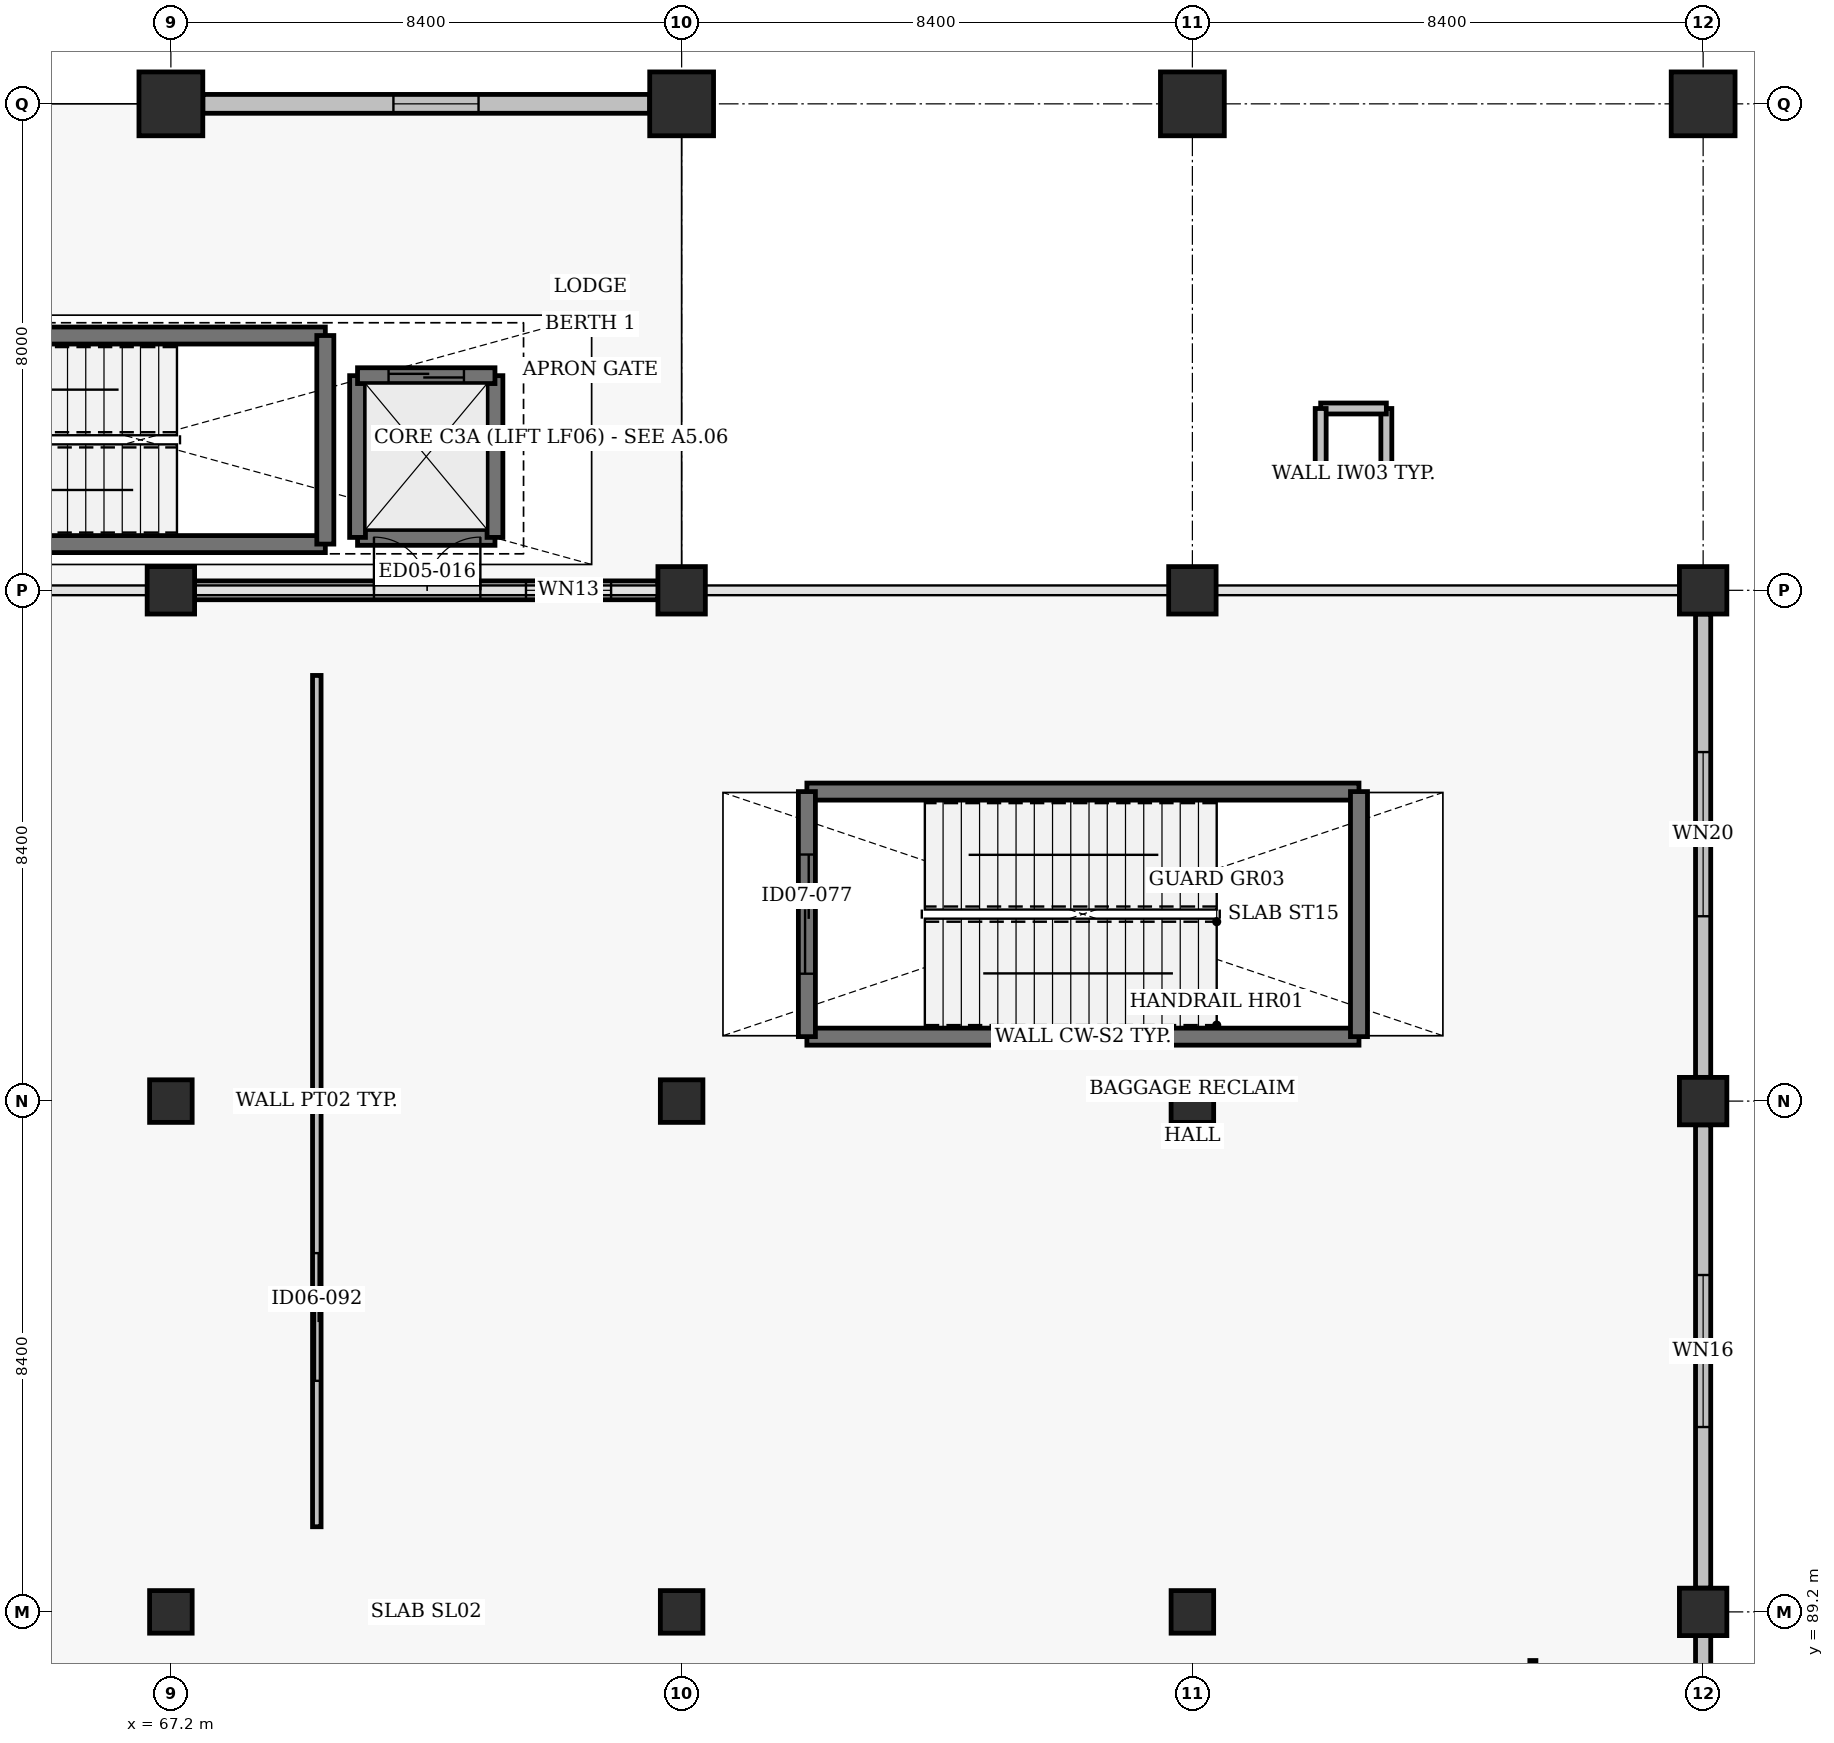
"""IFC4 building model, lengths in metres.
Left out: names, types, materials, properties, quantities, classifications, styles, units other than length and angle.
Written with IfcOpenShell. Run it as: python <this file> out.ifc"""

import sys

from ifc_helpers import new_model, si_unit, direction, frame, frame_2d, origin, origin_2d, place, context, subcontext, project, spatial, rectangle, circle, extrude, element, fill, save


model = new_model("IFC4")
c1 = context("Model", 3, precision=1e-05, world=origin(), true_north=direction((0.0, 1.0)))
c2 = subcontext(c1, "Body", "Model", "MODEL_VIEW")
j1 = project(units=[si_unit("LENGTHUNIT", "METRE"), si_unit("PLANEANGLEUNIT", "RADIAN")], contexts=[c1])
p1 = place(None, origin())
s1 = spatial("IfcSite", under=j1, at=p1, CompositionType="ELEMENT")
p2 = place(p1, origin())
s2 = spatial("IfcBuilding", under=s1, at=p2, CompositionType="ELEMENT")
p3 = place(p2, origin())
s3 = spatial("IfcBuildingStorey", under=s2, at=p3, CompositionType="ELEMENT", Elevation=0.0)
for number, where, z_axis, x_axis in (
    (1, (67.2, 89.2, -0.46), (0.0, 0.0, 1.0), (1.0, 0.0, 0.0)),
    (2, (67.2, 97.6, -0.46), (0.0, 0.0, 1.0), (1.0, 0.0, 0.0)),
):
    element("IfcColumn", number, at=place(p3, frame(where, z_axis=z_axis, x_axis=x_axis)), inside=s3, PredefinedType="COLUMN", context=c2, shape_type="SweptSolid", body=[
        extrude(rectangle(XDim=0.7, YDim=0.7, at=origin_2d()), origin(), (0.0, 0.0, 1.0), 5.9),
    ])
p4 = place(p3, frame((67.2, 106.0, -0.46), z_axis=(0.0, 0.0, 1.0), x_axis=(1.0, 0.0, 0.0)))
e3 = element("IfcColumn", 3, at=p4, inside=s3, PredefinedType="COLUMN", context=c2, shape_type="SweptSolid", body=[
    extrude(circle(Radius=0.39, at=origin_2d()), origin(), (0.0, 0.0, 1.0), 5.9),
])
for number, where, z_axis, x_axis in (
    (4, (75.6, 89.2, -0.46), (0.0, 0.0, 1.0), (1.0, 0.0, 0.0)),
    (5, (75.6, 97.6, -0.46), (0.0, 0.0, 1.0), (1.0, 0.0, 0.0)),
):
    element("IfcColumn", number, at=place(p3, frame(where, z_axis=z_axis, x_axis=x_axis)), inside=s3, PredefinedType="COLUMN", context=c2, shape_type="SweptSolid", body=[
        extrude(rectangle(XDim=0.7, YDim=0.7, at=origin_2d()), origin(), (0.0, 0.0, 1.0), 5.9),
    ])
p5 = place(p3, frame((75.6, 106.0, -0.46), z_axis=(0.0, 0.0, 1.0), x_axis=(1.0, 0.0, 0.0)))
e6 = element("IfcColumn", 6, at=p5, inside=s3, PredefinedType="COLUMN", context=c2, shape_type="SweptSolid", body=[
    extrude(circle(Radius=0.39, at=origin_2d()), origin(), (0.0, 0.0, 1.0), 5.9),
])
for number, where, z_axis, x_axis in (
    (7, (84.0, 89.2, -0.46), (0.0, 0.0, 1.0), (1.0, 0.0, 0.0)),
    (8, (84.0, 97.6, -0.46), (0.0, 0.0, 1.0), (1.0, 0.0, 0.0)),
):
    element("IfcColumn", number, at=place(p3, frame(where, z_axis=z_axis, x_axis=x_axis)), inside=s3, PredefinedType="COLUMN", context=c2, shape_type="SweptSolid", body=[
        extrude(rectangle(XDim=0.7, YDim=0.7, at=origin_2d()), origin(), (0.0, 0.0, 1.0), 5.9),
    ])
for number, where, z_axis, x_axis in (
    (9, (84.0, 106.0, -0.46), (0.0, 0.0, 1.0), (1.0, 0.0, 0.0)),
    (10, (92.4, 89.2, -0.46), (0.0, 0.0, 1.0), (1.0, 0.0, 0.0)),
    (11, (92.4, 97.6, -0.46), (0.0, 0.0, 1.0), (1.0, 0.0, 0.0)),
    (12, (92.4, 106.0, -0.46), (0.0, 0.0, 1.0), (1.0, 0.0, 0.0)),
):
    element("IfcColumn", number, at=place(p3, frame(where, z_axis=z_axis, x_axis=x_axis)), inside=s3, PredefinedType="COLUMN", context=c2, shape_type="SweptSolid", body=[
        extrude(circle(Radius=0.39, at=origin_2d()), origin(), (0.0, 0.0, 1.0), 5.9),
    ])
for number, where, z_axis, x_axis in (
    (13, (67.2, 114.0, -0.46), (0.0, 0.0, 1.0), (1.0, 0.0, 0.0)),
    (14, (75.6, 114.0, -0.46), (0.0, 0.0, 1.0), (1.0, 0.0, 0.0)),
    (15, (84.0, 114.0, -0.46), (0.0, 0.0, 1.0), (1.0, 0.0, 0.0)),
    (16, (92.4, 114.0, -0.46), (0.0, 0.0, 1.0), (1.0, 0.0, 0.0)),
):
    element("IfcColumn", number, at=place(p3, frame(where, z_axis=z_axis, x_axis=x_axis)), inside=s3, PredefinedType="PILASTER", context=c2, shape_type="SweptSolid", body=[
        extrude(circle(Radius=0.525, at=origin_2d()), origin(), (0.0, 0.0, 1.0), 5.9),
    ])
p6 = place(p3, frame((92.4, 81.19, 0.0), z_axis=(0.0, 0.0, 1.0), x_axis=(0.0, 1.0, 0.0)))
e17 = element("IfcWall", 17, at=p6, inside=s3, PredefinedType="SOLIDWALL", context=c2, shape_type="SweptSolid", body=[
    extrude(rectangle(XDim=7.62, YDim=0.25, at=frame_2d((3.81, 0.0))), origin(), (0.0, 0.0, 1.0), 4.605),
])
p7 = place(p6, frame((2.65, 0.0, 1.0)))
e18 = element("IfcOpeningElement", 18, at=p7, cuts=e17, PredefinedType="OPENING", context=c2, shape_type="SweptSolid", body=[
    extrude(rectangle(XDim=1.9, YDim=1.55, at=frame_2d((0.95, 0.775))), frame((0.0, 0.135, 0.0), z_axis=(0.0, -1.0, 0.0), x_axis=(1.0, 0.0, 0.0)), (0.0, 0.0, 1.0), 0.27),
])
p8 = place(p3, frame((92.4, 89.59, 0.0), z_axis=(0.0, 0.0, 1.0), x_axis=(0.0, 1.0, 0.0)))
e19 = element("IfcWall", 19, at=p8, inside=s3, PredefinedType="SOLIDWALL", context=c2, shape_type="SweptSolid", body=[
    extrude(rectangle(XDim=7.62, YDim=0.25, at=frame_2d((3.81, 0.0))), origin(), (0.0, 0.0, 1.0), 4.605),
])
p9 = place(p8, frame((2.65, 0.0, 1.0)))
e20 = element("IfcOpeningElement", 20, at=p9, cuts=e19, PredefinedType="OPENING", context=c2, shape_type="SweptSolid", body=[
    extrude(rectangle(XDim=2.5, YDim=1.05, at=frame_2d((1.25, 0.525))), frame((0.0, 0.135, 0.0), z_axis=(0.0, -1.0, 0.0), x_axis=(1.0, 0.0, 0.0)), (0.0, 0.0, 1.0), 0.27),
])
p10 = place(p3, frame((92.4, 97.99, 0.0), z_axis=(0.0, 0.0, 1.0), x_axis=(0.0, 1.0, 0.0)))
e21 = element("IfcWall", 21, at=p10, inside=s3, PredefinedType="SOLIDWALL", context=c2, shape_type="SweptSolid", body=[
    extrude(rectangle(XDim=7.62, YDim=0.25, at=frame_2d((3.81, 0.0))), origin(), (0.0, 0.0, 1.0), 4.605),
])
p11 = place(p10, frame((2.65, 0.0, 1.0)))
e22 = element("IfcOpeningElement", 22, at=p11, cuts=e21, PredefinedType="OPENING", context=c2, shape_type="SweptSolid", body=[
    extrude(rectangle(XDim=2.7, YDim=1.65, at=frame_2d((1.35, 0.825))), frame((0.0, 0.135, 0.0), z_axis=(0.0, -1.0, 0.0), x_axis=(1.0, 0.0, 0.0)), (0.0, 0.0, 1.0), 0.27),
])
p12 = place(p3, frame((67.59, 106.0, 0.0), z_axis=(0.0, 0.0, 1.0), x_axis=(1.0, 0.0, 0.0)))
e23 = element("IfcWall", 23, at=p12, inside=s3, PredefinedType="SOLIDWALL", context=c2, shape_type="SweptSolid", body=[
    extrude(rectangle(XDim=7.62, YDim=0.31, at=frame_2d((3.81, 0.0))), origin(), (0.0, 0.0, 1.0), 4.605),
])
p13 = place(p12, frame((2.95, 0.0, 0.0)))
e24 = element("IfcOpeningElement", 24, at=p13, cuts=e23, PredefinedType="OPENING", context=c2, shape_type="SweptSolid", body=[
    extrude(rectangle(XDim=1.75, YDim=2.15, at=frame_2d((0.875, 1.075))), frame((0.0, 0.165, 0.0), z_axis=(0.0, -1.0, 0.0), x_axis=(1.0, 0.0, 0.0)), (0.0, 0.0, 1.0), 0.33),
])
p14 = place(p12, frame((5.45, 0.0, 1.05)))
e25 = element("IfcOpeningElement", 25, at=p14, cuts=e23, PredefinedType="OPENING", context=c2, shape_type="SweptSolid", body=[
    extrude(rectangle(XDim=1.4, YDim=1.25, at=frame_2d((0.7, 0.625))), frame((0.0, 0.165, 0.0), z_axis=(0.0, -1.0, 0.0), x_axis=(1.0, 0.0, 0.0)), (0.0, 0.0, 1.0), 0.33),
])
p15 = place(p3, frame((75.075, 114.0, 0.0), z_axis=(0.0, 0.0, 1.0), x_axis=(-1.0, 0.0, 0.0)))
e26 = element("IfcWall", 26, at=p15, inside=s3, PredefinedType="SOLIDWALL", context=c2, shape_type="SweptSolid", body=[
    extrude(rectangle(XDim=7.35, YDim=0.31, at=frame_2d((3.675, 0.0))), origin(), (0.0, 0.0, 1.0), 4.835),
])
p16 = place(p15, frame((2.815, 0.0, 1.05)))
e27 = element("IfcOpeningElement", 27, at=p16, cuts=e26, PredefinedType="OPENING", context=c2, shape_type="SweptSolid", body=[
    extrude(rectangle(XDim=1.4, YDim=1.25, at=frame_2d((0.7, 0.625))), frame((0.0, 0.165, 0.0), z_axis=(0.0, -1.0, 0.0), x_axis=(1.0, 0.0, 0.0)), (0.0, 0.0, 1.0), 0.33),
])
for number, where, z_axis, x_axis in (
    (28, (60.86, 106.76, 0.0), (0.0, 0.0, 1.0), (1.0, 0.0, 0.0)),
    (29, (60.86, 110.19, 0.0), (0.0, 0.0, 1.0), (1.0, 0.0, 0.0)),
):
    element("IfcWall", number, at=place(p3, frame(where, z_axis=z_axis, x_axis=x_axis)), inside=s3, PredefinedType="SHEAR", context=c2, shape_type="SweptSolid", body=[
        extrude(rectangle(XDim=8.88, YDim=0.28, at=frame_2d((4.44, 0.0))), origin(), (0.0, 0.0, 1.0), 5.44),
    ])
p17 = place(p3, frame((69.74, 106.76, 0.0), z_axis=(0.0, 0.0, 1.0), x_axis=(0.0, 1.0, 0.0)))
e30 = element("IfcWall", 30, at=p17, inside=s3, PredefinedType="SHEAR", context=c2, shape_type="SweptSolid", body=[
    extrude(rectangle(XDim=3.43, YDim=0.28, at=frame_2d((1.715, 0.0))), origin(), (0.0, 0.0, 1.0), 5.44),
])
p18 = place(p3, frame((70.27, 106.87, 0.0), z_axis=(0.0, 0.0, 1.0), x_axis=(1.0, 0.0, 0.0)))
e31 = element("IfcWall", 31, at=p18, inside=s3, PredefinedType="SHEAR", context=c2, shape_type="SweptSolid", body=[
    extrude(rectangle(XDim=2.26, YDim=0.26, at=frame_2d((1.13, 0.0))), origin(), (0.0, 0.0, 1.0), 5.44),
])
for number, where, z_axis, x_axis in (
    (32, (72.53, 106.87, 0.0), (0.0, 0.0, 1.0), (0.0, 1.0, 0.0)),
    (33, (70.27, 109.53, 0.0), (0.0, 0.0, 1.0), (0.0, -1.0, 0.0)),
):
    element("IfcWall", number, at=place(p3, frame(where, z_axis=z_axis, x_axis=x_axis)), inside=s3, PredefinedType="SHEAR", context=c2, shape_type="SweptSolid", body=[
        extrude(rectangle(XDim=2.66, YDim=0.26, at=frame_2d((1.33, 0.0))), origin(), (0.0, 0.0, 1.0), 5.44),
    ])
p19 = place(p3, frame((70.27, 109.53, 0.0), z_axis=(0.0, 0.0, 1.0), x_axis=(1.0, 0.0, 0.0)))
e34 = element("IfcWall", 34, at=p19, inside=s3, PredefinedType="SHEAR", context=c2, shape_type="SweptSolid", body=[
    extrude(rectangle(XDim=2.26, YDim=0.26, at=frame_2d((1.13, 0.0))), origin(), (0.0, 0.0, 1.0), 5.44),
])
p20 = place(p19, frame((0.51, 0.0, 0.0)))
e35 = element("IfcOpeningElement", 35, at=p20, cuts=e34, PredefinedType="OPENING", context=c2, shape_type="SweptSolid", body=[
    extrude(rectangle(XDim=1.24, YDim=2.14, at=frame_2d((0.62, 1.07))), frame((0.0, 0.14, 0.0), z_axis=(0.0, -1.0, 0.0), x_axis=(1.0, 0.0, 0.0)), (0.0, 0.0, 1.0), 0.28),
])
for number, where, z_axis, x_axis in (
    (36, (77.66, 98.66, 0.0), (0.0, 0.0, 1.0), (1.0, 0.0, 0.0)),
    (37, (77.66, 102.69, 0.0), (0.0, 0.0, 1.0), (1.0, 0.0, 0.0)),
):
    element("IfcWall", number, at=place(p3, frame(where, z_axis=z_axis, x_axis=x_axis)), inside=s3, PredefinedType="SHEAR", context=c2, shape_type="SweptSolid", body=[
        extrude(rectangle(XDim=9.08, YDim=0.28, at=frame_2d((4.54, 0.0))), origin(), (0.0, 0.0, 1.0), 5.44),
    ])
p21 = place(p3, frame((77.66, 102.69, 0.0), z_axis=(0.0, 0.0, 1.0), x_axis=(0.0, -1.0, 0.0)))
e38 = element("IfcWall", 38, at=p21, inside=s3, PredefinedType="SHEAR", context=c2, shape_type="SweptSolid", body=[
    extrude(rectangle(XDim=4.03, YDim=0.28, at=frame_2d((2.015, 0.0))), origin(), (0.0, 0.0, 1.0), 5.44),
])
p22 = place(p21, frame((1.035, 0.0, 0.0)))
e39 = element("IfcOpeningElement", 39, at=p22, cuts=e38, PredefinedType="OPENING", context=c2, shape_type="SweptSolid", body=[
    extrude(rectangle(XDim=1.96, YDim=2.22, at=frame_2d((0.98, 1.11))), frame((0.0, 0.15, 0.0), z_axis=(0.0, -1.0, 0.0), x_axis=(1.0, 0.0, 0.0)), (0.0, 0.0, 1.0), 0.3),
])
p23 = place(p3, frame((86.74, 98.66, 0.0), z_axis=(0.0, 0.0, 1.0), x_axis=(0.0, 1.0, 0.0)))
e40 = element("IfcWall", 40, at=p23, inside=s3, PredefinedType="SHEAR", context=c2, shape_type="SweptSolid", body=[
    extrude(rectangle(XDim=4.03, YDim=0.28, at=frame_2d((2.015, 0.0))), origin(), (0.0, 0.0, 1.0), 5.44),
])
p24 = place(p3, frame((86.11, 107.91, 0.0), z_axis=(0.0, 0.0, 1.0), x_axis=(1.0, 0.0, 0.0)))
e41 = element("IfcWall", 41, at=p24, inside=s3, PredefinedType="SOLIDWALL", context=c2, shape_type="SweptSolid", body=[
    extrude(rectangle(XDim=1.08, YDim=0.18, at=frame_2d((0.54, 0.0))), origin(), (0.0, 0.0, 1.0), 2.6),
])
p25 = place(p3, frame((87.19, 107.91, 0.0), z_axis=(0.0, 0.0, 1.0), x_axis=(0.0, 1.0, 0.0)))
e42 = element("IfcWall", 42, at=p25, inside=s3, PredefinedType="SOLIDWALL", context=c2, shape_type="SweptSolid", body=[
    extrude(rectangle(XDim=1.08, YDim=0.18, at=frame_2d((0.54, 0.0))), origin(), (0.0, 0.0, 1.0), 2.6),
])
p26 = place(p3, frame((87.19, 108.99, 0.0), z_axis=(0.0, 0.0, 1.0), x_axis=(-1.0, 0.0, 0.0)))
e43 = element("IfcWall", 43, at=p26, inside=s3, PredefinedType="SOLIDWALL", context=c2, shape_type="SweptSolid", body=[
    extrude(rectangle(XDim=1.08, YDim=0.18, at=frame_2d((0.54, 0.0))), origin(), (0.0, 0.0, 1.0), 2.6),
])
p27 = place(p3, frame((86.11, 108.99, 0.0), z_axis=(0.0, 0.0, 1.0), x_axis=(0.0, -1.0, 0.0)))
e44 = element("IfcWall", 44, at=p27, inside=s3, PredefinedType="SOLIDWALL", context=c2, shape_type="SweptSolid", body=[
    extrude(rectangle(XDim=1.08, YDim=0.18, at=frame_2d((0.54, 0.0))), origin(), (0.0, 0.0, 1.0), 2.6),
])
p28 = place(p3, frame((69.6, 90.6, 0.0), z_axis=(0.0, 0.0, 1.0), x_axis=(0.0, 1.0, 0.0)))
e45 = element("IfcWall", 45, at=p28, inside=s3, PredefinedType="PARTITIONING", context=c2, shape_type="SweptSolid", body=[
    extrude(rectangle(XDim=14.0, YDim=0.14, at=frame_2d((7.0, 0.0))), origin(), (0.0, 0.0, 1.0), 3.1),
])
p29 = place(p28, frame((2.4, 0.0, 0.0)))
e46 = element("IfcOpeningElement", 46, at=p29, cuts=e45, PredefinedType="OPENING", context=c2, shape_type="SweptSolid", body=[
    extrude(rectangle(XDim=2.1, YDim=2.22, at=frame_2d((1.05, 1.11))), frame((0.0, 0.08, 0.0), z_axis=(0.0, -1.0, 0.0), x_axis=(1.0, 0.0, 0.0)), (0.0, 0.0, 1.0), 0.16),
])
p30 = place(p3, frame((89.6, 73.2, 0.0), z_axis=(0.0, 0.0, 1.0), x_axis=(0.0, 1.0, 0.0)))
e47 = element("IfcWall", 47, at=p30, inside=s3, PredefinedType="PARTITIONING", context=c2, shape_type="SweptSolid", body=[
    extrude(rectangle(XDim=15.2, YDim=0.1, at=frame_2d((7.6, 0.0))), origin(), (0.0, 0.0, 1.0), 3.0),
])
p31 = place(p30, frame((10.6, 0.0, 0.0)))
e48 = element("IfcOpeningElement", 48, at=p31, cuts=e47, PredefinedType="OPENING", context=c2, shape_type="SweptSolid", body=[
    extrude(rectangle(XDim=1.06, YDim=2.1, at=frame_2d((0.53, 1.05))), frame((0.0, 0.06, 0.0), z_axis=(0.0, -1.0, 0.0), x_axis=(1.0, 0.0, 0.0)), (0.0, 0.0, 1.0), 0.12),
])
p32 = place(p9, origin())
e49 = element("IfcWindow", 49, at=p32, inside=s3, PartitioningType="TRIPLE_PANEL_VERTICAL", PredefinedType="WINDOW", context=c2, shape_type="SweptSolid", body=[
    extrude(rectangle(XDim=2.5, YDim=1.05, at=frame_2d((1.25, 0.525))), frame((0.0, 0.03, 0.0), z_axis=(0.0, -1.0, 0.0), x_axis=(1.0, 0.0, 0.0)), (0.0, 0.0, 1.0), 0.06),
])
fill(e20, e49)
p33 = place(p11, origin())
e50 = element("IfcWindow", 50, at=p33, inside=s3, PartitioningType="TRIPLE_PANEL_VERTICAL", PredefinedType="WINDOW", context=c2, shape_type="SweptSolid", body=[
    extrude(rectangle(XDim=2.7, YDim=1.65, at=frame_2d((1.35, 0.825))), frame((0.0, 0.03, 0.0), z_axis=(0.0, -1.0, 0.0), x_axis=(1.0, 0.0, 0.0)), (0.0, 0.0, 1.0), 0.06),
])
fill(e22, e50)
p34 = place(p13, origin())
e51 = element("IfcDoor", 51, at=p34, inside=s3, OperationType="DOUBLE_DOOR_SINGLE_SWING", PredefinedType="DOOR", context=c2, shape_type="SweptSolid", body=[
    extrude(rectangle(XDim=1.75, YDim=2.15, at=frame_2d((0.875, 1.075))), frame((0.0, 0.025, 0.0), z_axis=(0.0, -1.0, 0.0), x_axis=(1.0, 0.0, 0.0)), (0.0, 0.0, 1.0), 0.05),
])
fill(e24, e51)
p35 = place(p14, origin())
e52 = element("IfcWindow", 52, at=p35, inside=s3, PartitioningType="SINGLE_PANEL", PredefinedType="WINDOW", context=c2, shape_type="SweptSolid", body=[
    extrude(rectangle(XDim=1.4, YDim=1.25, at=frame_2d((0.7, 0.625))), frame((0.0, 0.03, 0.0), z_axis=(0.0, -1.0, 0.0), x_axis=(1.0, 0.0, 0.0)), (0.0, 0.0, 1.0), 0.06),
])
fill(e25, e52)
p36 = place(p16, origin())
e53 = element("IfcWindow", 53, at=p36, inside=s3, PartitioningType="SINGLE_PANEL", PredefinedType="WINDOW", context=c2, shape_type="SweptSolid", body=[
    extrude(rectangle(XDim=1.4, YDim=1.25, at=frame_2d((0.7, 0.625))), frame((0.0, 0.03, 0.0), z_axis=(0.0, -1.0, 0.0), x_axis=(1.0, 0.0, 0.0)), (0.0, 0.0, 1.0), 0.06),
])
fill(e27, e53)
p37 = place(p20, origin())
e54 = element("IfcDoor", 54, at=p37, inside=s3, OperationType="DOUBLE_DOOR_SLIDING", PredefinedType="DOOR", context=c2, shape_type="SweptSolid", body=[
    extrude(rectangle(XDim=1.24, YDim=2.14, at=frame_2d((0.62, 1.07))), frame((0.0, 0.025, 0.0), z_axis=(0.0, -1.0, 0.0), x_axis=(1.0, 0.0, 0.0)), (0.0, 0.0, 1.0), 0.05),
])
fill(e35, e54)
p38 = place(p22, origin())
e55 = element("IfcDoor", 55, at=p38, inside=s3, OperationType="DOUBLE_DOOR_SLIDING", PredefinedType="DOOR", context=c2, shape_type="SweptSolid", body=[
    extrude(rectangle(XDim=1.96, YDim=2.22, at=frame_2d((0.98, 1.11))), frame((0.0, 0.025, 0.0), z_axis=(0.0, -1.0, 0.0), x_axis=(1.0, 0.0, 0.0)), (0.0, 0.0, 1.0), 0.05),
])
fill(e39, e55)
p39 = place(p29, origin())
e56 = element("IfcDoor", 56, at=p39, inside=s3, OperationType="DOUBLE_DOOR_SLIDING", PredefinedType="DOOR", context=c2, shape_type="SweptSolid", body=[
    extrude(rectangle(XDim=2.1, YDim=2.22, at=frame_2d((1.05, 1.11))), frame((0.0, 0.025, 0.0), z_axis=(0.0, -1.0, 0.0), x_axis=(1.0, 0.0, 0.0)), (0.0, 0.0, 1.0), 0.05),
])
fill(e46, e56)
save(model, sys.argv[1])
